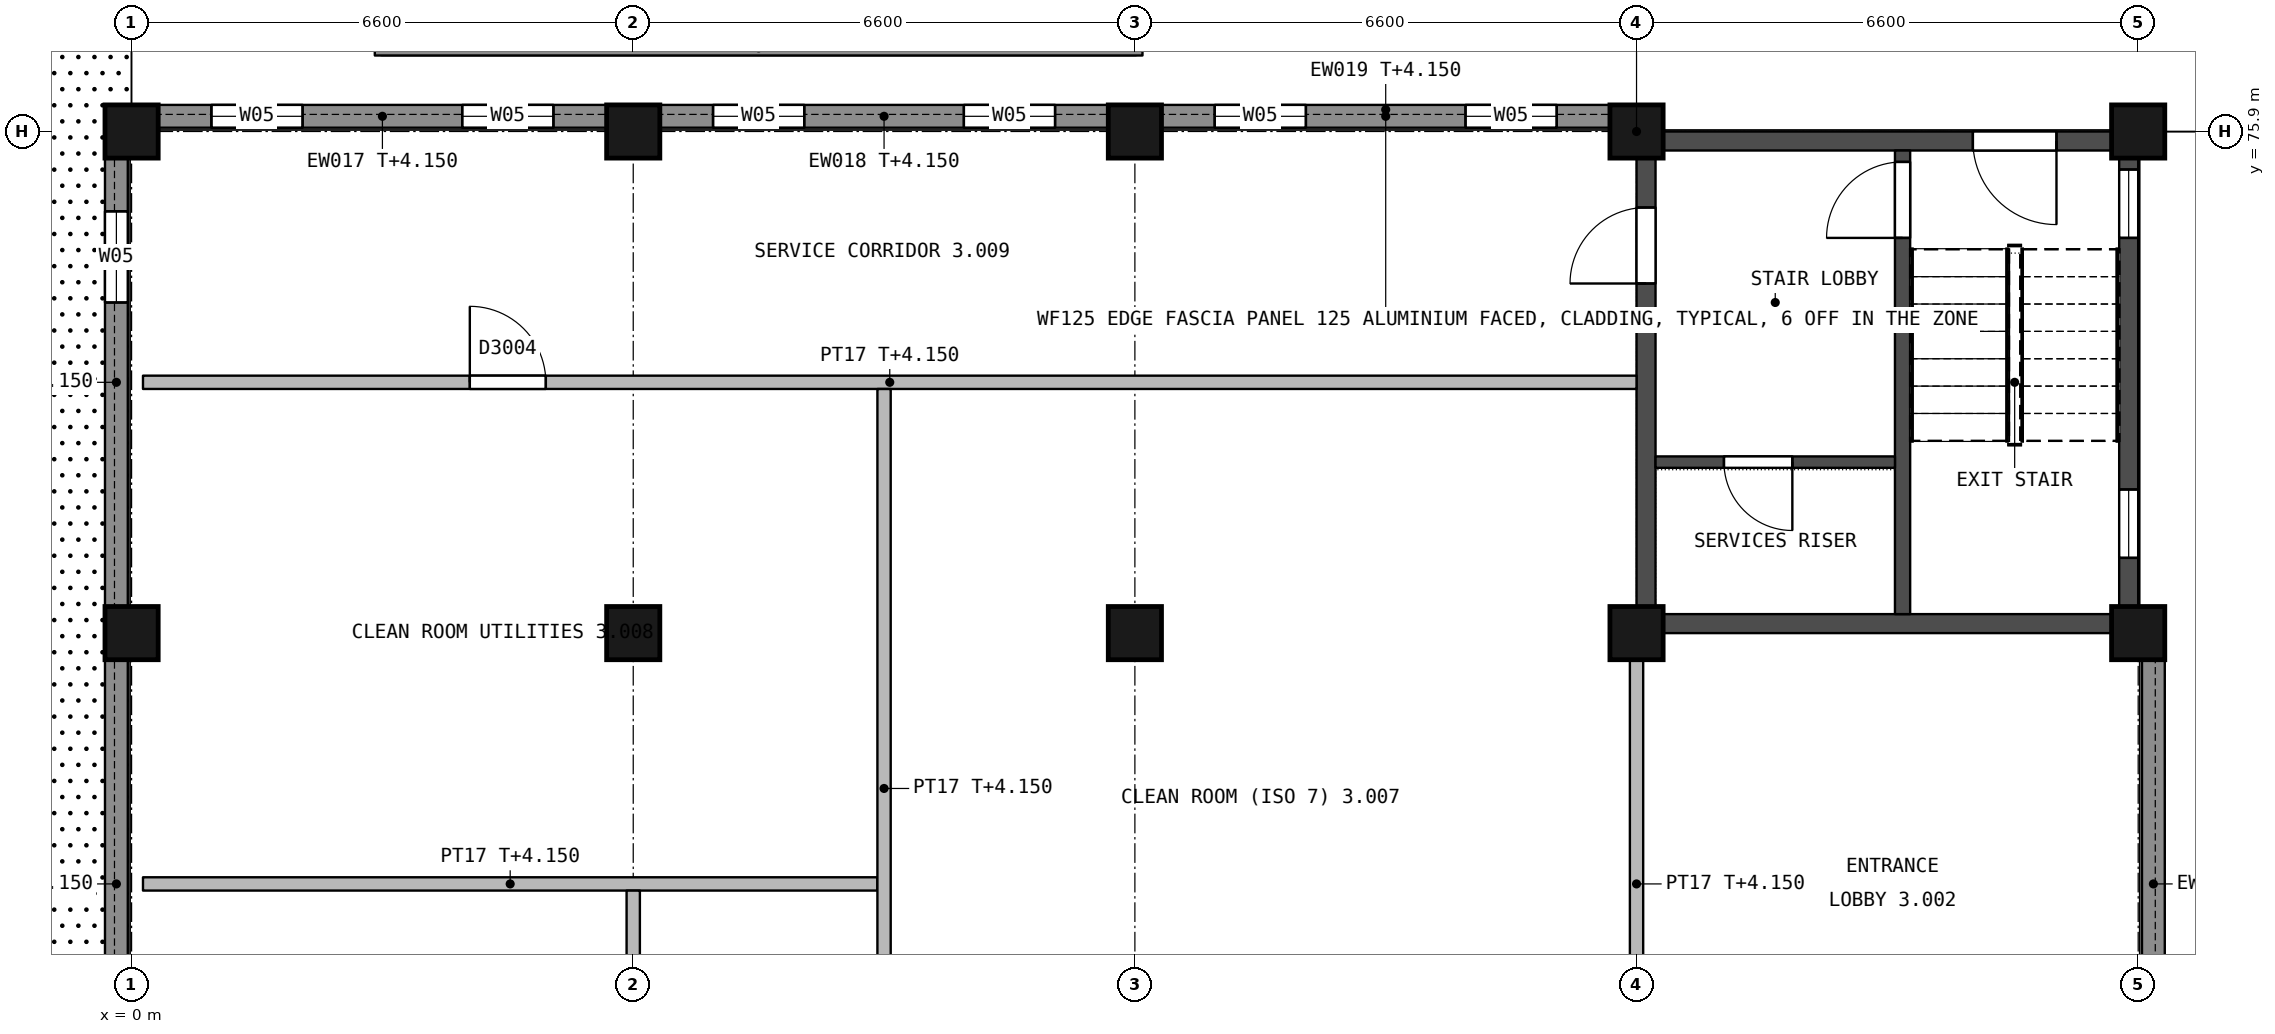
"""IFC4 building model, lengths in metres.
Left out: names, types, materials, properties, quantities, classifications, styles, units other than length and angle.
Written with IfcOpenShell. Run it as: python <this file> out.ifc"""

import sys

from ifc_helpers import new_model, si_unit, direction, frame, frame_2d, origin, origin_2d, place, context, subcontext, project, spatial, rectangle, extrude, element, fill, save


model = new_model("IFC4")
c1 = context("Model", 3, precision=1e-05, world=origin(), true_north=direction((0.0, 1.0)))
c2 = subcontext(c1, "Body", "Model", "MODEL_VIEW")
j1 = project(units=[si_unit("LENGTHUNIT", "METRE"), si_unit("PLANEANGLEUNIT", "RADIAN")], contexts=[c1])
p1 = place(None, origin())
s1 = spatial("IfcSite", under=j1, at=p1, CompositionType="ELEMENT")
p2 = place(p1, origin())
s2 = spatial("IfcBuilding", under=s1, at=p2, CompositionType="ELEMENT")
p3 = place(p2, origin())
s3 = spatial("IfcBuildingStorey", under=s2, at=p3, CompositionType="ELEMENT", Elevation=0.0)
for number, where, z_axis, x_axis in (
    (1, (0.0, 69.3, 0.0), (0.0, 0.0, 1.0), (1.0, 0.0, 0.0)),
    (2, (0.0, 75.9, 0.0), (0.0, 0.0, 1.0), (1.0, 0.0, 0.0)),
    (3, (6.6, 69.3, 0.0), (0.0, 0.0, 1.0), (1.0, 0.0, 0.0)),
    (4, (6.6, 75.9, 0.0), (0.0, 0.0, 1.0), (1.0, 0.0, 0.0)),
    (5, (13.2, 69.3, 0.0), (0.0, 0.0, 1.0), (1.0, 0.0, 0.0)),
    (6, (13.2, 75.9, 0.0), (0.0, 0.0, 1.0), (1.0, 0.0, 0.0)),
    (7, (19.8, 69.3, 0.0), (0.0, 0.0, 1.0), (1.0, 0.0, 0.0)),
    (8, (19.8, 75.9, 0.0), (0.0, 0.0, 1.0), (1.0, 0.0, 0.0)),
    (9, (26.4, 69.3, 0.0), (0.0, 0.0, 1.0), (1.0, 0.0, 0.0)),
    (10, (26.4, 75.9, 0.0), (0.0, 0.0, 1.0), (1.0, 0.0, 0.0)),
):
    element("IfcColumn", number, at=place(p3, frame(where, z_axis=z_axis, x_axis=x_axis)), inside=s3, PredefinedType="COLUMN", context=c2, shape_type="SweptSolid", body=[
        extrude(rectangle(XDim=0.7, YDim=0.7, at=origin_2d()), origin(), (0.0, 0.0, 1.0), 5.4),
    ])
p4 = place(p3, frame((19.925, 75.9, 0.0), z_axis=(0.0, 0.0, 1.0), x_axis=(0.0, -1.0, 0.0)))
e11 = element("IfcWall", 11, at=p4, inside=s3, PredefinedType="SHEAR", context=c2, shape_type="SweptSolid", body=[
    extrude(rectangle(XDim=6.6, YDim=0.25, at=frame_2d((3.3, 0.0))), origin(), (0.0, 0.0, 1.0), 5.05),
])
p5 = place(p4, frame((1.0, 0.0, 0.0)))
e12 = element("IfcOpeningElement", 12, at=p5, cuts=e11, PredefinedType="OPENING", context=c2, shape_type="SweptSolid", body=[
    extrude(rectangle(XDim=1.0, YDim=2.1, at=frame_2d((0.5, 1.05))), frame((0.0, 0.135, 0.0), z_axis=(0.0, -1.0, 0.0), x_axis=(1.0, 0.0, 0.0)), (0.0, 0.0, 1.0), 0.27),
])
p6 = place(p3, frame((26.275, 75.9, 0.0), z_axis=(0.0, 0.0, 1.0), x_axis=(0.0, -1.0, 0.0)))
e13 = element("IfcWall", 13, at=p6, inside=s3, PredefinedType="SHEAR", context=c2, shape_type="SweptSolid", body=[
    extrude(rectangle(XDim=6.6, YDim=0.25, at=frame_2d((3.3, 0.0))), origin(), (0.0, 0.0, 1.0), 5.05),
])
p7 = place(p6, frame((4.71, 0.0, 2.05)))
e14 = element("IfcOpeningElement", 14, at=p7, cuts=e13, PredefinedType="OPENING", context=c2, shape_type="SweptSolid", body=[
    extrude(rectangle(XDim=0.9, YDim=1.2, at=frame_2d((0.45, 0.6))), frame((0.0, 0.135, 0.0), z_axis=(0.0, -1.0, 0.0), x_axis=(1.0, 0.0, 0.0)), (0.0, 0.0, 1.0), 0.27),
])
p8 = place(p6, frame((0.5, 0.0, 3.4)))
e15 = element("IfcOpeningElement", 15, at=p8, cuts=e13, PredefinedType="OPENING", context=c2, shape_type="SweptSolid", body=[
    extrude(rectangle(XDim=0.9, YDim=1.2, at=frame_2d((0.45, 0.6))), frame((0.0, 0.135, 0.0), z_axis=(0.0, -1.0, 0.0), x_axis=(1.0, 0.0, 0.0)), (0.0, 0.0, 1.0), 0.27),
])
p9 = place(p3, frame((20.05, 75.775, 0.0), z_axis=(0.0, 0.0, 1.0), x_axis=(1.0, 0.0, 0.0)))
e16 = element("IfcWall", 16, at=p9, inside=s3, PredefinedType="SHEAR", context=c2, shape_type="SweptSolid", body=[
    extrude(rectangle(XDim=6.1, YDim=0.25, at=frame_2d((3.05, 0.0))), origin(), (0.0, 0.0, 1.0), 5.05),
])
p10 = place(p9, frame((4.175, 0.0, 0.0)))
e17 = element("IfcOpeningElement", 17, at=p10, cuts=e16, PredefinedType="OPENING", context=c2, shape_type="SweptSolid", body=[
    extrude(rectangle(XDim=1.1, YDim=2.4, at=frame_2d((0.55, 1.2))), frame((0.0, 0.135, 0.0), z_axis=(0.0, -1.0, 0.0), x_axis=(1.0, 0.0, 0.0)), (0.0, 0.0, 1.0), 0.27),
])
p11 = place(p3, frame((20.05, 69.425, 0.0), z_axis=(0.0, 0.0, 1.0), x_axis=(1.0, 0.0, 0.0)))
e18 = element("IfcWall", 18, at=p11, inside=s3, PredefinedType="SHEAR", context=c2, shape_type="SweptSolid", body=[
    extrude(rectangle(XDim=6.1, YDim=0.25, at=frame_2d((3.05, 0.0))), origin(), (0.0, 0.0, 1.0), 5.05),
])
p12 = place(p3, frame((23.3, 75.65, 0.0), z_axis=(0.0, 0.0, 1.0), x_axis=(0.0, -1.0, 0.0)))
e19 = element("IfcWall", 19, at=p12, inside=s3, PredefinedType="SHEAR", context=c2, shape_type="SweptSolid", body=[
    extrude(rectangle(XDim=6.1, YDim=0.2, at=frame_2d((3.05, 0.0))), origin(), (0.0, 0.0, 1.0), 5.05),
])
p13 = place(p12, frame((0.15, 0.0, 0.0)))
e20 = element("IfcOpeningElement", 20, at=p13, cuts=e19, PredefinedType="OPENING", context=c2, shape_type="SweptSolid", body=[
    extrude(rectangle(XDim=1.0, YDim=2.1, at=frame_2d((0.5, 1.05))), frame((0.0, 0.11, 0.0), z_axis=(0.0, -1.0, 0.0), x_axis=(1.0, 0.0, 0.0)), (0.0, 0.0, 1.0), 0.22),
])
p14 = place(p3, frame((20.05, 71.55, 0.0), z_axis=(0.0, 0.0, 1.0), x_axis=(1.0, 0.0, 0.0)))
e21 = element("IfcWall", 21, at=p14, inside=s3, PredefinedType="SHEAR", context=c2, shape_type="SweptSolid", body=[
    extrude(rectangle(XDim=3.15, YDim=0.15, at=frame_2d((1.575, 0.0))), origin(), (0.0, 0.0, 1.0), 5.05),
])
p15 = place(p14, frame((0.9, 0.0, 0.0)))
e22 = element("IfcOpeningElement", 22, at=p15, cuts=e21, PredefinedType="OPENING", context=c2, shape_type="SweptSolid", body=[
    extrude(rectangle(XDim=0.9, YDim=2.1, at=frame_2d((0.45, 1.05))), frame((0.0, 0.085, 0.0), z_axis=(0.0, -1.0, 0.0), x_axis=(1.0, 0.0, 0.0)), (0.0, 0.0, 1.0), 0.17),
])
p16 = place(p3, frame((26.6, 68.95, 0.0), z_axis=(0.0, 0.0, 1.0), x_axis=(0.0, -1.0, 0.0)))
e23 = element("IfcWall", 23, at=p16, inside=s3, PredefinedType="STANDARD", context=c2, shape_type="SweptSolid", body=[
    extrude(rectangle(XDim=5.9, YDim=0.3, at=frame_2d((2.95, 0.0))), origin(), (0.0, 0.0, 1.0), 4.15),
])
p17 = place(p3, frame((0.35, 76.1, 0.0), z_axis=(0.0, 0.0, 1.0), x_axis=(1.0, 0.0, 0.0)))
e24 = element("IfcWall", 24, at=p17, inside=s3, PredefinedType="STANDARD", context=c2, shape_type="SweptSolid", body=[
    extrude(rectangle(XDim=5.9, YDim=0.3, at=frame_2d((2.95, 0.0))), origin(), (0.0, 0.0, 1.0), 4.15),
])
p18 = place(p17, frame((0.7, 0.0, 1.1)))
e25 = element("IfcOpeningElement", 25, at=p18, cuts=e24, PredefinedType="OPENING", context=c2, shape_type="SweptSolid", body=[
    extrude(rectangle(XDim=1.2, YDim=1.2, at=frame_2d((0.6, 0.6))), frame((0.0, 0.16, 0.0), z_axis=(0.0, -1.0, 0.0), x_axis=(1.0, 0.0, 0.0)), (0.0, 0.0, 1.0), 0.32),
])
p19 = place(p17, frame((4.0, 0.0, 1.1)))
e26 = element("IfcOpeningElement", 26, at=p19, cuts=e24, PredefinedType="OPENING", context=c2, shape_type="SweptSolid", body=[
    extrude(rectangle(XDim=1.2, YDim=1.2, at=frame_2d((0.6, 0.6))), frame((0.0, 0.16, 0.0), z_axis=(0.0, -1.0, 0.0), x_axis=(1.0, 0.0, 0.0)), (0.0, 0.0, 1.0), 0.32),
])
p20 = place(p3, frame((6.95, 76.1, 0.0), z_axis=(0.0, 0.0, 1.0), x_axis=(1.0, 0.0, 0.0)))
e27 = element("IfcWall", 27, at=p20, inside=s3, PredefinedType="STANDARD", context=c2, shape_type="SweptSolid", body=[
    extrude(rectangle(XDim=5.9, YDim=0.3, at=frame_2d((2.95, 0.0))), origin(), (0.0, 0.0, 1.0), 4.15),
])
p21 = place(p20, frame((0.7, 0.0, 1.1)))
e28 = element("IfcOpeningElement", 28, at=p21, cuts=e27, PredefinedType="OPENING", context=c2, shape_type="SweptSolid", body=[
    extrude(rectangle(XDim=1.2, YDim=1.2, at=frame_2d((0.6, 0.6))), frame((0.0, 0.16, 0.0), z_axis=(0.0, -1.0, 0.0), x_axis=(1.0, 0.0, 0.0)), (0.0, 0.0, 1.0), 0.32),
])
p22 = place(p20, frame((4.0, 0.0, 1.1)))
e29 = element("IfcOpeningElement", 29, at=p22, cuts=e27, PredefinedType="OPENING", context=c2, shape_type="SweptSolid", body=[
    extrude(rectangle(XDim=1.2, YDim=1.2, at=frame_2d((0.6, 0.6))), frame((0.0, 0.16, 0.0), z_axis=(0.0, -1.0, 0.0), x_axis=(1.0, 0.0, 0.0)), (0.0, 0.0, 1.0), 0.32),
])
p23 = place(p3, frame((13.55, 76.1, 0.0), z_axis=(0.0, 0.0, 1.0), x_axis=(1.0, 0.0, 0.0)))
e30 = element("IfcWall", 30, at=p23, inside=s3, PredefinedType="STANDARD", context=c2, shape_type="SweptSolid", body=[
    extrude(rectangle(XDim=5.9, YDim=0.3, at=frame_2d((2.95, 0.0))), origin(), (0.0, 0.0, 1.0), 4.15),
])
p24 = place(p23, frame((0.7, 0.0, 1.1)))
e31 = element("IfcOpeningElement", 31, at=p24, cuts=e30, PredefinedType="OPENING", context=c2, shape_type="SweptSolid", body=[
    extrude(rectangle(XDim=1.2, YDim=1.2, at=frame_2d((0.6, 0.6))), frame((0.0, 0.16, 0.0), z_axis=(0.0, -1.0, 0.0), x_axis=(1.0, 0.0, 0.0)), (0.0, 0.0, 1.0), 0.32),
])
p25 = place(p23, frame((4.0, 0.0, 1.1)))
e32 = element("IfcOpeningElement", 32, at=p25, cuts=e30, PredefinedType="OPENING", context=c2, shape_type="SweptSolid", body=[
    extrude(rectangle(XDim=1.2, YDim=1.2, at=frame_2d((0.6, 0.6))), frame((0.0, 0.16, 0.0), z_axis=(0.0, -1.0, 0.0), x_axis=(1.0, 0.0, 0.0)), (0.0, 0.0, 1.0), 0.32),
])
p26 = place(p3, frame((-0.2, 63.05, 0.0), z_axis=(0.0, 0.0, 1.0), x_axis=(0.0, 1.0, 0.0)))
e33 = element("IfcWall", 33, at=p26, inside=s3, PredefinedType="STANDARD", context=c2, shape_type="SweptSolid", body=[
    extrude(rectangle(XDim=5.9, YDim=0.3, at=frame_2d((2.95, 0.0))), origin(), (0.0, 0.0, 1.0), 4.15),
])
p27 = place(p3, frame((-0.2, 69.65, 0.0), z_axis=(0.0, 0.0, 1.0), x_axis=(0.0, 1.0, 0.0)))
e34 = element("IfcWall", 34, at=p27, inside=s3, PredefinedType="STANDARD", context=c2, shape_type="SweptSolid", body=[
    extrude(rectangle(XDim=5.9, YDim=0.3, at=frame_2d((2.95, 0.0))), origin(), (0.0, 0.0, 1.0), 4.15),
])
p28 = place(p27, frame((4.0, 0.0, 1.1)))
e35 = element("IfcOpeningElement", 35, at=p28, cuts=e34, PredefinedType="OPENING", context=c2, shape_type="SweptSolid", body=[
    extrude(rectangle(XDim=1.2, YDim=1.2, at=frame_2d((0.6, 0.6))), frame((0.0, 0.16, 0.0), z_axis=(0.0, -1.0, 0.0), x_axis=(1.0, 0.0, 0.0)), (0.0, 0.0, 1.0), 0.32),
])
p29 = place(p3, frame((0.15, 66.0, 0.0), z_axis=(0.0, 0.0, 1.0), x_axis=(1.0, 0.0, 0.0)))
e36 = element("IfcWall", 36, at=p29, inside=s3, PredefinedType="PARTITIONING", context=c2, shape_type="SweptSolid", body=[
    extrude(rectangle(XDim=9.662, YDim=0.175, at=frame_2d((4.831, 0.0))), origin(), (0.0, 0.0, 1.0), 4.15),
])
p30 = place(p3, frame((19.8, 72.6, 0.0), z_axis=(0.0, 0.0, 1.0), x_axis=(-1.0, 0.0, 0.0)))
e37 = element("IfcWall", 37, at=p30, inside=s3, PredefinedType="PARTITIONING", context=c2, shape_type="SweptSolid", body=[
    extrude(rectangle(XDim=19.65, YDim=0.175, at=frame_2d((9.825, 0.0))), origin(), (0.0, 0.0, 1.0), 4.15),
])
p31 = place(p30, frame((14.35, 0.0, 0.0)))
e38 = element("IfcOpeningElement", 38, at=p31, cuts=e37, PredefinedType="OPENING", context=c2, shape_type="SweptSolid", body=[
    extrude(rectangle(XDim=1.0, YDim=2.1, at=frame_2d((0.5, 1.05))), frame((0.0, 0.097, 0.0), z_axis=(0.0, -1.0, 0.0), x_axis=(1.0, 0.0, 0.0)), (0.0, 0.0, 1.0), 0.195),
])
p32 = place(p3, frame((6.6, 63.05, 0.0), z_axis=(0.0, 0.0, 1.0), x_axis=(0.0, 1.0, 0.0)))
e39 = element("IfcWall", 39, at=p32, inside=s3, PredefinedType="PARTITIONING", context=c2, shape_type="SweptSolid", body=[
    extrude(rectangle(XDim=2.862, YDim=0.175, at=frame_2d((1.431, 0.0))), origin(), (0.0, 0.0, 1.0), 4.15),
])
p33 = place(p3, frame((9.9, 59.487, 0.0), z_axis=(0.0, 0.0, 1.0), x_axis=(0.0, 1.0, 0.0)))
e40 = element("IfcWall", 40, at=p33, inside=s3, PredefinedType="PARTITIONING", context=c2, shape_type="SweptSolid", body=[
    extrude(rectangle(XDim=13.025, YDim=0.175, at=frame_2d((6.512, 0.0))), origin(), (0.0, 0.0, 1.0), 4.15),
])
p34 = place(p33, frame((2.463, 0.0, 0.0)))
e41 = element("IfcOpeningElement", 41, at=p34, cuts=e40, PredefinedType="OPENING", context=c2, shape_type="SweptSolid", body=[
    extrude(rectangle(XDim=1.5, YDim=2.1, at=frame_2d((0.75, 1.05))), frame((0.0, 0.097, 0.0), z_axis=(0.0, -1.0, 0.0), x_axis=(1.0, 0.0, 0.0)), (0.0, 0.0, 1.0), 0.195),
])
p35 = place(p3, frame((19.8, 63.05, 0.0), z_axis=(0.0, 0.0, 1.0), x_axis=(0.0, 1.0, 0.0)))
e42 = element("IfcWall", 42, at=p35, inside=s3, PredefinedType="PARTITIONING", context=c2, shape_type="SweptSolid", body=[
    extrude(rectangle(XDim=5.9, YDim=0.175, at=frame_2d((2.95, 0.0))), origin(), (0.0, 0.0, 1.0), 4.15),
])
p36 = place(p3, frame((3.2, 77.0, 0.0), z_axis=(0.0, 0.0, 1.0), x_axis=(1.0, 0.0, 0.0)))
e43 = element("IfcWall", 43, at=p36, inside=s3, PredefinedType="PARTITIONING", context=c2, shape_type="SweptSolid", body=[
    extrude(rectangle(XDim=10.1, YDim=0.2, at=frame_2d((5.05, 0.0))), origin(), (0.0, 0.0, 1.0), 0.45),
])
p37 = place(p15, origin())
e44 = element("IfcDoor", 44, at=p37, inside=s3, OperationType="SINGLE_SWING_RIGHT", PredefinedType="DOOR", context=c2, shape_type="SweptSolid", body=[
    extrude(rectangle(XDim=0.9, YDim=2.1, at=frame_2d((0.45, 1.05))), frame((0.0, 0.025, 0.0), z_axis=(0.0, -1.0, 0.0), x_axis=(1.0, 0.0, 0.0)), (0.0, 0.0, 1.0), 0.05),
])
fill(e22, e44)
p38 = place(p5, origin())
e45 = element("IfcDoor", 45, at=p38, inside=s3, OperationType="SINGLE_SWING_RIGHT", PredefinedType="DOOR", context=c2, shape_type="SweptSolid", body=[
    extrude(rectangle(XDim=1.0, YDim=2.1, at=frame_2d((0.5, 1.05))), frame((0.0, 0.025, 0.0), z_axis=(0.0, -1.0, 0.0), x_axis=(1.0, 0.0, 0.0)), (0.0, 0.0, 1.0), 0.05),
])
fill(e12, e45)
p39 = place(p13, origin())
e46 = element("IfcDoor", 46, at=p39, inside=s3, OperationType="SINGLE_SWING_RIGHT", PredefinedType="DOOR", context=c2, shape_type="SweptSolid", body=[
    extrude(rectangle(XDim=1.0, YDim=2.1, at=frame_2d((0.5, 1.05))), frame((0.0, 0.025, 0.0), z_axis=(0.0, -1.0, 0.0), x_axis=(1.0, 0.0, 0.0)), (0.0, 0.0, 1.0), 0.05),
])
fill(e20, e46)
p40 = place(p10, origin())
e47 = element("IfcDoor", 47, at=p40, inside=s3, OperationType="SINGLE_SWING_RIGHT", PredefinedType="DOOR", context=c2, shape_type="SweptSolid", body=[
    extrude(rectangle(XDim=1.1, YDim=2.4, at=frame_2d((0.55, 1.2))), frame((0.0, 0.025, 0.0), z_axis=(0.0, -1.0, 0.0), x_axis=(1.0, 0.0, 0.0)), (0.0, 0.0, 1.0), 0.05),
])
fill(e17, e47)
p41 = place(p7, origin())
e48 = element("IfcWindow", 48, at=p41, inside=s3, PartitioningType="SINGLE_PANEL", PredefinedType="WINDOW", context=c2, shape_type="SweptSolid", body=[
    extrude(rectangle(XDim=0.9, YDim=1.2, at=frame_2d((0.45, 0.6))), frame((0.0, 0.03, 0.0), z_axis=(0.0, -1.0, 0.0), x_axis=(1.0, 0.0, 0.0)), (0.0, 0.0, 1.0), 0.06),
])
fill(e14, e48)
p42 = place(p8, origin())
e49 = element("IfcWindow", 49, at=p42, inside=s3, PartitioningType="SINGLE_PANEL", PredefinedType="WINDOW", context=c2, shape_type="SweptSolid", body=[
    extrude(rectangle(XDim=0.9, YDim=1.2, at=frame_2d((0.45, 0.6))), frame((0.0, 0.03, 0.0), z_axis=(0.0, -1.0, 0.0), x_axis=(1.0, 0.0, 0.0)), (0.0, 0.0, 1.0), 0.06),
])
fill(e15, e49)
p43 = place(p18, origin())
e50 = element("IfcWindow", 50, at=p43, inside=s3, PartitioningType="SINGLE_PANEL", PredefinedType="WINDOW", context=c2, shape_type="SweptSolid", body=[
    extrude(rectangle(XDim=1.2, YDim=1.2, at=frame_2d((0.6, 0.6))), frame((0.0, 0.03, 0.0), z_axis=(0.0, -1.0, 0.0), x_axis=(1.0, 0.0, 0.0)), (0.0, 0.0, 1.0), 0.06),
])
fill(e25, e50)
p44 = place(p19, origin())
e51 = element("IfcWindow", 51, at=p44, inside=s3, PartitioningType="SINGLE_PANEL", PredefinedType="WINDOW", context=c2, shape_type="SweptSolid", body=[
    extrude(rectangle(XDim=1.2, YDim=1.2, at=frame_2d((0.6, 0.6))), frame((0.0, 0.03, 0.0), z_axis=(0.0, -1.0, 0.0), x_axis=(1.0, 0.0, 0.0)), (0.0, 0.0, 1.0), 0.06),
])
fill(e26, e51)
p45 = place(p21, origin())
e52 = element("IfcWindow", 52, at=p45, inside=s3, PartitioningType="SINGLE_PANEL", PredefinedType="WINDOW", context=c2, shape_type="SweptSolid", body=[
    extrude(rectangle(XDim=1.2, YDim=1.2, at=frame_2d((0.6, 0.6))), frame((0.0, 0.03, 0.0), z_axis=(0.0, -1.0, 0.0), x_axis=(1.0, 0.0, 0.0)), (0.0, 0.0, 1.0), 0.06),
])
fill(e28, e52)
p46 = place(p22, origin())
e53 = element("IfcWindow", 53, at=p46, inside=s3, PartitioningType="SINGLE_PANEL", PredefinedType="WINDOW", context=c2, shape_type="SweptSolid", body=[
    extrude(rectangle(XDim=1.2, YDim=1.2, at=frame_2d((0.6, 0.6))), frame((0.0, 0.03, 0.0), z_axis=(0.0, -1.0, 0.0), x_axis=(1.0, 0.0, 0.0)), (0.0, 0.0, 1.0), 0.06),
])
fill(e29, e53)
p47 = place(p24, origin())
e54 = element("IfcWindow", 54, at=p47, inside=s3, PartitioningType="SINGLE_PANEL", PredefinedType="WINDOW", context=c2, shape_type="SweptSolid", body=[
    extrude(rectangle(XDim=1.2, YDim=1.2, at=frame_2d((0.6, 0.6))), frame((0.0, 0.03, 0.0), z_axis=(0.0, -1.0, 0.0), x_axis=(1.0, 0.0, 0.0)), (0.0, 0.0, 1.0), 0.06),
])
fill(e31, e54)
p48 = place(p25, origin())
e55 = element("IfcWindow", 55, at=p48, inside=s3, PartitioningType="SINGLE_PANEL", PredefinedType="WINDOW", context=c2, shape_type="SweptSolid", body=[
    extrude(rectangle(XDim=1.2, YDim=1.2, at=frame_2d((0.6, 0.6))), frame((0.0, 0.03, 0.0), z_axis=(0.0, -1.0, 0.0), x_axis=(1.0, 0.0, 0.0)), (0.0, 0.0, 1.0), 0.06),
])
fill(e32, e55)
p49 = place(p28, origin())
e56 = element("IfcWindow", 56, at=p49, inside=s3, PartitioningType="SINGLE_PANEL", PredefinedType="WINDOW", context=c2, shape_type="SweptSolid", body=[
    extrude(rectangle(XDim=1.2, YDim=1.2, at=frame_2d((0.6, 0.6))), frame((0.0, 0.03, 0.0), z_axis=(0.0, -1.0, 0.0), x_axis=(1.0, 0.0, 0.0)), (0.0, 0.0, 1.0), 0.06),
])
fill(e35, e56)
p50 = place(p31, origin())
e57 = element("IfcDoor", 57, at=p50, inside=s3, OperationType="SINGLE_SWING_RIGHT", PredefinedType="DOOR", context=c2, shape_type="SweptSolid", body=[
    extrude(rectangle(XDim=1.0, YDim=2.1, at=frame_2d((0.5, 1.05))), frame((0.0, 0.025, 0.0), z_axis=(0.0, -1.0, 0.0), x_axis=(1.0, 0.0, 0.0)), (0.0, 0.0, 1.0), 0.05),
])
fill(e38, e57)
save(model, sys.argv[1])
